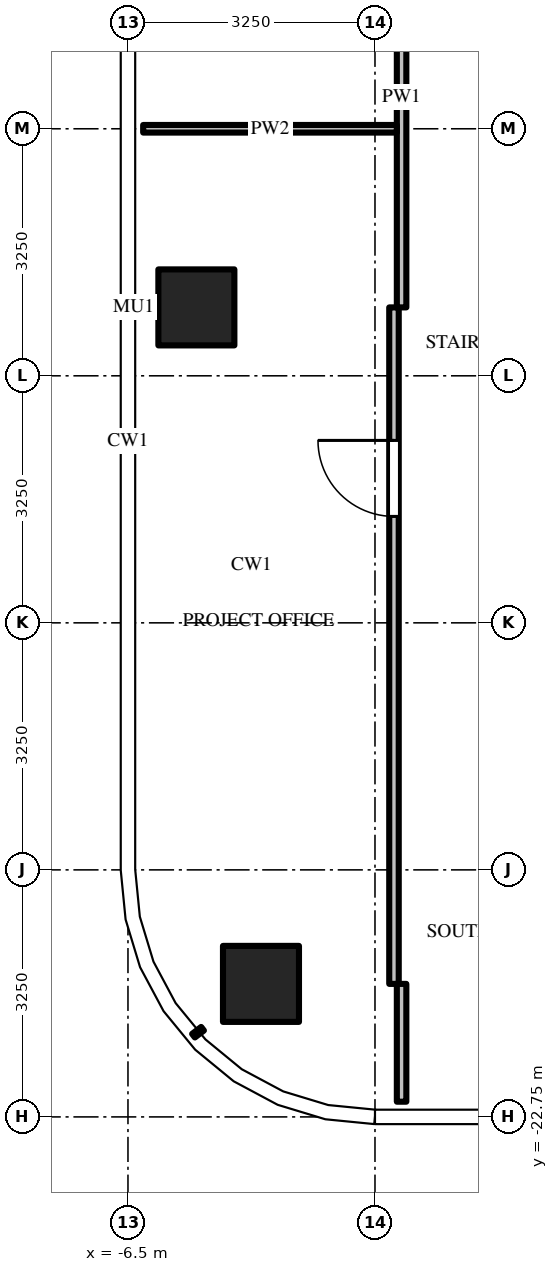
"""IFC4 building model, lengths in metres.
Left out: names, types, materials, properties, quantities, classifications, styles, units other than length and angle.
Written with IfcOpenShell. Run it as: python <this file> out.ifc"""

import sys

from ifc_helpers import new_model, si_unit, direction, frame, frame_2d, origin, origin_2d, place, context, subcontext, project, spatial, rectangle, extrude, source, transform, mapped, element, fill, save


model = new_model("IFC4")
c1 = context("Model", 3, precision=1e-05, world=origin(), true_north=direction((0.0, 1.0)))
c2 = subcontext(c1, "Body", "Model", "MODEL_VIEW")
j1 = project(units=[si_unit("LENGTHUNIT", "METRE"), si_unit("PLANEANGLEUNIT", "RADIAN")], contexts=[c1])
p1 = place(None, origin())
s1 = spatial("IfcSite", under=j1, at=p1, CompositionType="ELEMENT")
p2 = place(p1, origin())
s2 = spatial("IfcBuilding", under=s1, at=p2, CompositionType="ELEMENT")
p3 = place(p2, frame((0.0, 0.0, 283.3)))
s3 = spatial("IfcBuildingStorey", under=s2, at=p3, CompositionType="ELEMENT", Elevation=283.3)
m1 = source(origin(), c2, "Body", "SweptSolid", [
    extrude(rectangle(XDim=1.0, YDim=1.0, at=origin_2d()), origin(), (0.0, 0.0, 1.0), 3.9),
])
for number, where, z_axis, x_axis in (
    (1, (-5.6, -12.1, 0.0), (0.0, 0.0, 1.0), (1.0, 0.0, 0.0)),
    (2, (-4.75, -21.0, 0.0), (0.0, 0.0, 1.0), (1.0, 0.0, 0.0)),
):
    element("IfcColumn", number, at=place(p3, frame(where, z_axis=z_axis, x_axis=x_axis)), inside=s3, PredefinedType="COLUMN", context=c2, shape_type="MappedRepresentation", body=[
        mapped(m1, transform((0.0, 0.0, 0.0))),
    ])
m2 = source(origin(), c2, "Body", "SweptSolid", [
    extrude(rectangle(XDim=8.9, YDim=0.125, at=frame_2d((4.45, 0.0))), origin(), (0.0, 0.0, 1.0), 2.78),
])
p4 = place(p3, frame((-3.0, -21.0, 0.0), z_axis=(0.0, 0.0, 1.0), x_axis=(0.0, 1.0, 0.0)))
e3 = element("IfcWall", 3, at=p4, inside=s3, PredefinedType="PARTITIONING", context=c2, shape_type="MappedRepresentation", body=[
    mapped(m2, transform((0.0, 0.0, 0.0))),
])
m3 = source(origin(), c2, "Body", "SweptSolid", [
    extrude(rectangle(XDim=1.0, YDim=2.1, at=frame_2d((0.5, 1.05))), frame((0.0, 0.073, 0.0), z_axis=(0.0, -1.0, 0.0), x_axis=(1.0, 0.0, 0.0)), (0.0, 0.0, 1.0), 0.145),
])
p5 = place(p4, frame((6.15, 0.0, 0.0)))
e4 = element("IfcOpeningElement", 4, at=p5, cuts=e3, PredefinedType="OPENING", context=c2, shape_type="MappedRepresentation", body=[
    mapped(m3, transform((0.0, 0.0, 0.0))),
])
m4 = source(origin(), c2, "Body", "SweptSolid", [
    extrude(rectangle(XDim=1.55, YDim=0.125, at=frame_2d((0.775, 0.0))), origin(), (0.0, 0.0, 1.0), 2.78),
])
p6 = place(p3, frame((-2.9, -22.55, 0.0), z_axis=(0.0, 0.0, 1.0), x_axis=(0.0, 1.0, 0.0)))
e5 = element("IfcWall", 5, at=p6, inside=s3, PredefinedType="PARTITIONING", context=c2, shape_type="MappedRepresentation", body=[
    mapped(m4, transform((0.0, 0.0, 0.0))),
])
m5 = source(origin(), c2, "Body", "SweptSolid", [
    extrude(rectangle(XDim=5.538, YDim=0.125, at=frame_2d((2.769, 0.0))), origin(), (0.0, 0.0, 1.0), 2.997),
])
p7 = place(p3, frame((-2.9, -12.1, 0.0), z_axis=(0.0, 0.0, 1.0), x_axis=(0.0, 1.0, 0.0)))
e6 = element("IfcWall", 6, at=p7, inside=s3, PredefinedType="PARTITIONING", context=c2, shape_type="MappedRepresentation", body=[
    mapped(m5, transform((0.0, 0.0, 0.0))),
])
m6 = source(origin(), c2, "Body", "SweptSolid", [
    extrude(rectangle(XDim=3.338, YDim=0.1, at=frame_2d((1.669, 0.0))), origin(), (0.0, 0.0, 1.0), 2.78),
])
p8 = place(p3, frame((-6.3, -9.75, 0.0), z_axis=(0.0, 0.0, 1.0), x_axis=(1.0, 0.0, 0.0)))
e7 = element("IfcWall", 7, at=p8, inside=s3, PredefinedType="PARTITIONING", context=c2, shape_type="MappedRepresentation", body=[
    mapped(m6, transform((0.0, 0.0, 0.0))),
])
m7 = source(origin(), c2, "Body", "SweptSolid", [
    extrude(rectangle(XDim=1.0, YDim=2.1, at=frame_2d((0.5, 1.05))), frame((0.0, 0.025, 0.0), z_axis=(0.0, -1.0, 0.0), x_axis=(1.0, 0.0, 0.0)), (0.0, 0.0, 1.0), 0.05),
])
p9 = place(p5, origin())
e8 = element("IfcDoor", 8, at=p9, inside=s3, OperationType="SINGLE_SWING_RIGHT", PredefinedType="DOOR", context=c2, shape_type="MappedRepresentation", body=[
    mapped(m7, transform((0.0, 0.0, 0.0))),
])
fill(e4, e8)
save(model, sys.argv[1])
